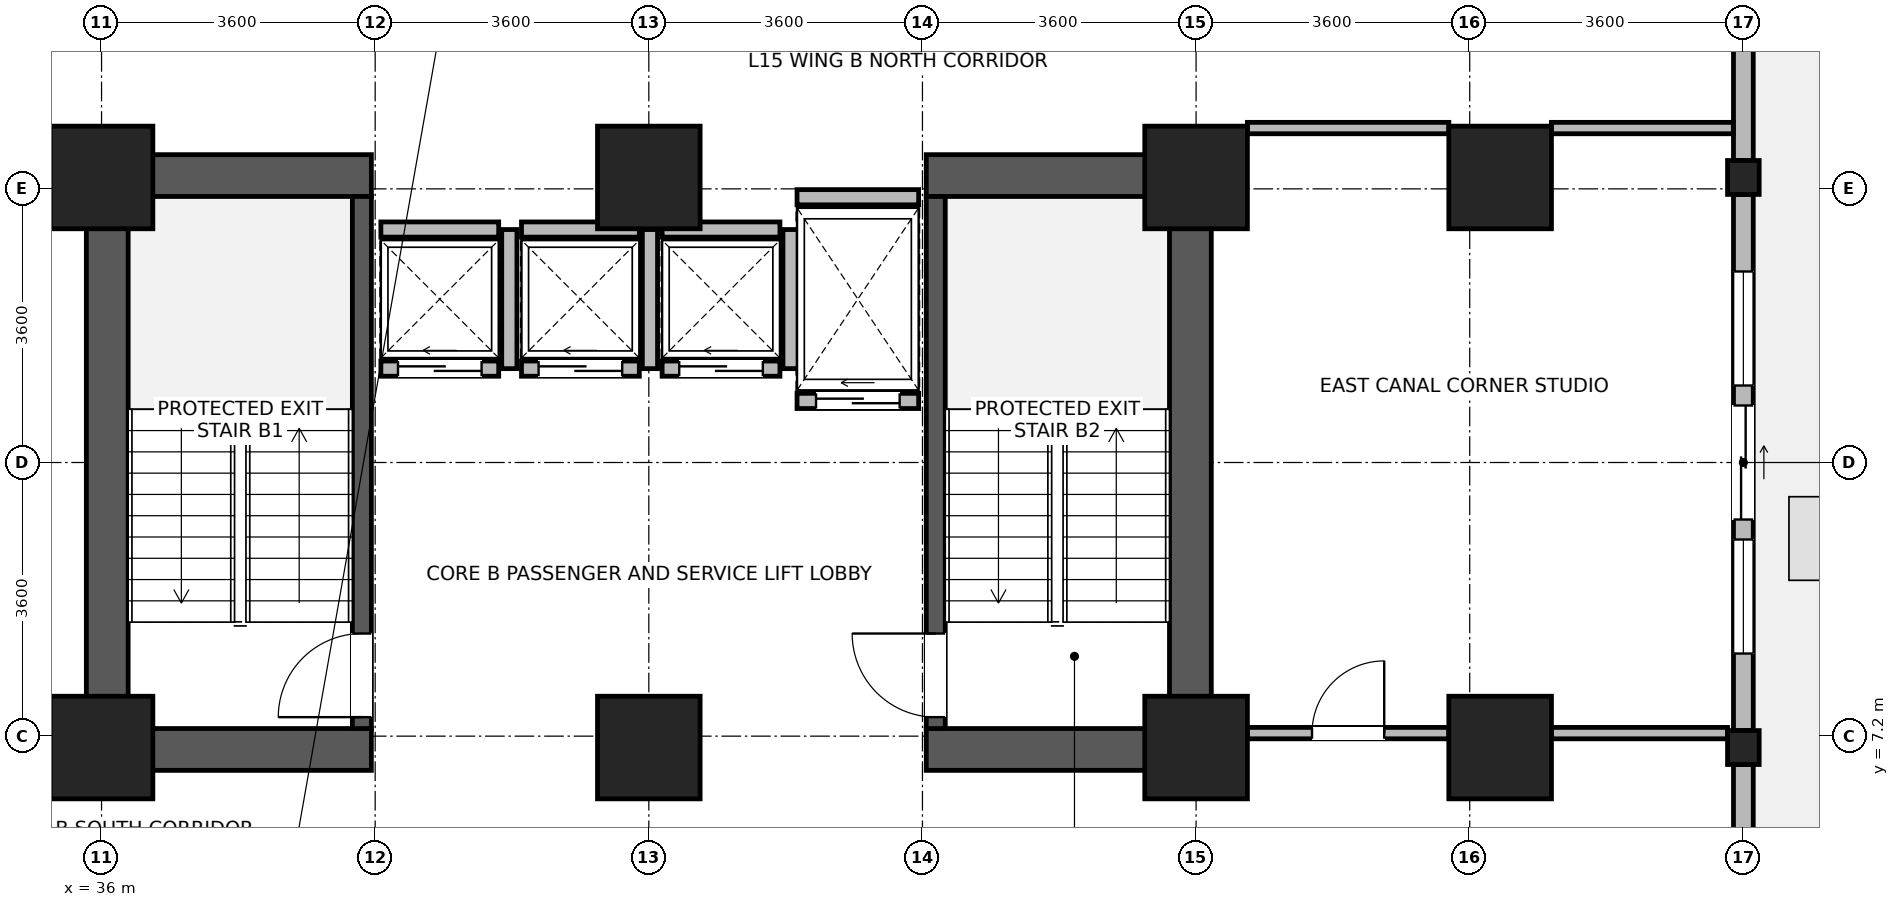
"""IFC4 building model, lengths in metres.
Left out: names, types, materials, properties, quantities, classifications, styles, units other than length and angle.
Written with IfcOpenShell. Run it as: python <this file> out.ifc"""

import sys

from ifc_helpers import new_model, si_unit, direction, frame, frame_2d, origin, origin_2d, place, context, subcontext, project, spatial, rectangle, i_section, extrude, source, transform, mapped, element, fill, save


model = new_model("IFC4")
c1 = context("Model", 3, precision=1e-05, world=origin(), true_north=direction((0.0, 1.0)))
c2 = subcontext(c1, "Body", "Model", "MODEL_VIEW")
j1 = project(units=[si_unit("LENGTHUNIT", "METRE"), si_unit("PLANEANGLEUNIT", "RADIAN")], contexts=[c1])
p1 = place(None, origin())
s1 = spatial("IfcSite", under=j1, at=p1, CompositionType="ELEMENT")
p2 = place(p1, origin())
s2 = spatial("IfcBuilding", under=s1, at=p2, CompositionType="ELEMENT")
p3 = place(p2, frame((0.0, 0.0, 62.3)))
s3 = spatial("IfcBuildingStorey", under=s2, at=p3, CompositionType="ELEMENT", Elevation=62.3)
for number, where, z_axis, x_axis in (
    (1, (36.075, 6.75, 0.0), (0.0, 0.0, 1.0), (0.0, 1.0, 0.0)),
    (2, (50.325, 6.75, 0.0), (0.0, 0.0, 1.0), (0.0, 1.0, 0.0)),
):
    element("IfcWall", number, at=place(p3, frame(where, z_axis=z_axis, x_axis=x_axis)), inside=s3, PredefinedType="SHEAR", context=c2, shape_type="SweptSolid", body=[
        extrude(rectangle(XDim=8.1, YDim=0.55, at=frame_2d((4.05, 0.0))), origin(), (0.0, 0.0, 1.0), 3.45),
    ])
for number, where, z_axis, x_axis in (
    (3, (36.35, 7.025, 0.0), (0.0, 0.0, 1.0), (1.0, 0.0, 0.0)),
    (4, (46.85, 7.025, 0.0), (0.0, 0.0, 1.0), (1.0, 0.0, 0.0)),
    (5, (36.35, 14.575, 0.0), (0.0, 0.0, 1.0), (1.0, 0.0, 0.0)),
    (6, (46.85, 14.575, 0.0), (0.0, 0.0, 1.0), (1.0, 0.0, 0.0)),
):
    element("IfcWall", number, at=place(p3, frame(where, z_axis=z_axis, x_axis=x_axis)), inside=s3, PredefinedType="SHEAR", context=c2, shape_type="SweptSolid", body=[
        extrude(rectangle(XDim=3.2, YDim=0.55, at=frame_2d((1.6, 0.0))), origin(), (0.0, 0.0, 1.0), 3.45),
    ])
p4 = place(p3, frame((39.425, 7.3, 0.0), z_axis=(0.0, 0.0, 1.0), x_axis=(0.0, 1.0, 0.0)))
e7 = element("IfcWall", 7, at=p4, inside=s3, PredefinedType="SHEAR", context=c2, shape_type="SweptSolid", body=[
    extrude(rectangle(XDim=7.0, YDim=0.25, at=frame_2d((3.5, 0.0))), origin(), (0.0, 0.0, 1.0), 3.45),
])
p5 = place(p4, frame((0.15, 0.0, 0.0)))
e8 = element("IfcOpeningElement", 8, at=p5, cuts=e7, PredefinedType="OPENING", context=c2, shape_type="SweptSolid", body=[
    extrude(rectangle(XDim=1.1, YDim=2.08, at=frame_2d((0.55, 1.04))), frame((0.0, 0.135, 0.0), z_axis=(0.0, -1.0, 0.0), x_axis=(1.0, 0.0, 0.0)), (0.0, 0.0, 1.0), 0.27),
])
p6 = place(p3, frame((46.975, 7.3, 0.0), z_axis=(0.0, 0.0, 1.0), x_axis=(0.0, 1.0, 0.0)))
e9 = element("IfcWall", 9, at=p6, inside=s3, PredefinedType="SHEAR", context=c2, shape_type="SweptSolid", body=[
    extrude(rectangle(XDim=7.0, YDim=0.25, at=frame_2d((3.5, 0.0))), origin(), (0.0, 0.0, 1.0), 3.45),
])
p7 = place(p6, frame((0.15, 0.0, 0.0)))
e10 = element("IfcOpeningElement", 10, at=p7, cuts=e9, PredefinedType="OPENING", context=c2, shape_type="SweptSolid", body=[
    extrude(rectangle(XDim=1.1, YDim=2.08, at=frame_2d((0.55, 1.04))), frame((0.0, 0.135, 0.0), z_axis=(0.0, -1.0, 0.0), x_axis=(1.0, 0.0, 0.0)), (0.0, 0.0, 1.0), 0.27),
])
m1 = source(origin(), c2, "Body", "SweptSolid", [
    extrude(rectangle(XDim=1.35, YDim=1.35, at=origin_2d()), origin(), (0.0, 0.0, 1.0), 3.7),
])
for number, where, z_axis, x_axis in (
    (11, (36.0, 7.05, 0.0), (0.0, 0.0, 1.0), (1.0, 0.0, 0.0)),
    (12, (36.0, 14.55, 0.0), (0.0, 0.0, 1.0), (1.0, 0.0, 0.0)),
    (13, (43.2, 7.05, 0.0), (0.0, 0.0, 1.0), (1.0, 0.0, 0.0)),
    (14, (43.2, 14.55, 0.0), (0.0, 0.0, 1.0), (1.0, 0.0, 0.0)),
    (15, (50.4, 7.05, 0.0), (0.0, 0.0, 1.0), (1.0, 0.0, 0.0)),
    (16, (50.4, 14.55, 0.0), (0.0, 0.0, 1.0), (1.0, 0.0, 0.0)),
    (17, (54.4, 7.05, 0.0), (0.0, 0.0, 1.0), (1.0, 0.0, 0.0)),
    (18, (54.4, 14.55, 0.0), (0.0, 0.0, 1.0), (1.0, 0.0, 0.0)),
):
    element("IfcColumn", number, at=place(p3, frame(where, z_axis=z_axis, x_axis=x_axis)), inside=s3, PredefinedType="COLUMN", context=c2, shape_type="MappedRepresentation", body=[
        mapped(m1, transform((0.0, 0.0, 0.0), x_axis=(1.0, 0.0, 0.0), y_axis=(0.0, 1.0, 0.0), z_axis=(0.0, 0.0, 1.0), scale=1.0)),
    ])
m2 = source(origin(), c2, "Body", "SweptSolid", [
    extrude(i_section(OverallWidth=0.416, OverallDepth=0.446, WebThickness=0.029, FlangeThickness=0.04, FilletRadius=0.015, at=origin_2d()), origin(), (0.0, 0.0, 1.0), 3.7),
])
for number, where, z_axis, x_axis in (
    (19, (57.6, 7.05, 0.0), (0.0, 0.0, 1.0), (1.0, 0.0, 0.0)),
    (20, (57.6, 14.55, 0.0), (0.0, 0.0, 1.0), (1.0, 0.0, 0.0)),
):
    element("IfcColumn", number, at=place(p3, frame(where, z_axis=z_axis, x_axis=x_axis)), inside=s3, PredefinedType="COLUMN", context=c2, shape_type="MappedRepresentation", body=[
        mapped(m2, transform((0.0, 0.0, 0.0), x_axis=(1.0, 0.0, 0.0), y_axis=(0.0, 1.0, 0.0), z_axis=(0.0, 0.0, 1.0), scale=1.0)),
    ])
p8 = place(p3, frame((57.6, 6.826, 0.0), z_axis=(0.0, 0.0, 1.0), x_axis=(0.0, -1.0, 0.0)))
e21 = element("IfcWall", 21, at=p8, inside=s3, PredefinedType="STANDARD", context=c2, shape_type="SweptSolid", body=[
    extrude(rectangle(XDim=2.156, YDim=0.26, at=frame_2d((1.078, 0.0))), origin(), (0.0, 0.0, 1.0), 3.43),
])
p9 = place(p3, frame((57.6, 14.326, 0.0), z_axis=(0.0, 0.0, 1.0), x_axis=(0.0, -1.0, 0.0)))
e22 = element("IfcWall", 22, at=p9, inside=s3, PredefinedType="STANDARD", context=c2, shape_type="SweptSolid", body=[
    extrude(rectangle(XDim=7.052, YDim=0.26, at=frame_2d((3.526, 0.0))), origin(), (0.0, 0.0, 1.0), 2.93),
])
p10 = place(p9, frame((2.776, 0.0, 0.0)))
e23 = element("IfcOpeningElement", 23, at=p10, cuts=e22, PredefinedType="OPENING", context=c2, shape_type="SweptSolid", body=[
    extrude(rectangle(XDim=1.5, YDim=2.15, at=frame_2d((0.75, 1.075))), frame((0.0, 0.14, 0.0), z_axis=(0.0, -1.0, 0.0), x_axis=(1.0, 0.0, 0.0)), (0.0, 0.0, 1.0), 0.28),
])
p11 = place(p9, frame((1.013, 0.0, 0.85)))
e24 = element("IfcOpeningElement", 24, at=p11, cuts=e22, PredefinedType="OPENING", context=c2, shape_type="SweptSolid", body=[
    extrude(rectangle(XDim=1.5, YDim=1.85, at=frame_2d((0.75, 0.925))), frame((0.0, 0.14, 0.0), z_axis=(0.0, -1.0, 0.0), x_axis=(1.0, 0.0, 0.0)), (0.0, 0.0, 1.0), 0.28),
])
p12 = place(p9, frame((4.539, 0.0, 0.85)))
e25 = element("IfcOpeningElement", 25, at=p12, cuts=e22, PredefinedType="OPENING", context=c2, shape_type="SweptSolid", body=[
    extrude(rectangle(XDim=1.5, YDim=1.85, at=frame_2d((0.75, 0.925))), frame((0.0, 0.14, 0.0), z_axis=(0.0, -1.0, 0.0), x_axis=(1.0, 0.0, 0.0)), (0.0, 0.0, 1.0), 0.28),
])
p13 = place(p3, frame((57.6, 21.376, 0.0), z_axis=(0.0, 0.0, 1.0), x_axis=(0.0, -1.0, 0.0)))
e26 = element("IfcWall", 26, at=p13, inside=s3, PredefinedType="STANDARD", context=c2, shape_type="SweptSolid", body=[
    extrude(rectangle(XDim=6.602, YDim=0.26, at=frame_2d((3.301, 0.0))), origin(), (0.0, 0.0, 1.0), 2.93),
])
p14 = place(p13, frame((0.9, 0.0, 0.85)))
e27 = element("IfcOpeningElement", 27, at=p14, cuts=e26, PredefinedType="OPENING", context=c2, shape_type="SweptSolid", body=[
    extrude(rectangle(XDim=1.5, YDim=1.85, at=frame_2d((0.75, 0.925))), frame((0.0, 0.14, 0.0), z_axis=(0.0, -1.0, 0.0), x_axis=(1.0, 0.0, 0.0)), (0.0, 0.0, 1.0), 0.28),
])
p15 = place(p13, frame((2.826, 0.0, 0.85)))
e28 = element("IfcOpeningElement", 28, at=p15, cuts=e26, PredefinedType="OPENING", context=c2, shape_type="SweptSolid", body=[
    extrude(rectangle(XDim=0.95, YDim=1.75, at=frame_2d((0.475, 0.875))), frame((0.0, 0.14, 0.0), z_axis=(0.0, -1.0, 0.0), x_axis=(1.0, 0.0, 0.0)), (0.0, 0.0, 1.0), 0.28),
])
p16 = place(p3, frame((39.675, 12.035, 0.0), z_axis=(0.0, 0.0, 1.0), x_axis=(1.0, 0.0, 0.0)))
e29 = element("IfcWall", 29, at=p16, inside=s3, PredefinedType="PARTITIONING", context=c2, shape_type="SweptSolid", body=[
    extrude(rectangle(XDim=1.55, YDim=0.2, at=frame_2d((0.775, 0.0))), origin(), (0.0, 0.0, 1.0), 3.43),
])
p17 = place(p16, frame((0.225, 0.0, 0.0)))
e30 = element("IfcOpeningElement", 30, at=p17, cuts=e29, PredefinedType="OPENING", context=c2, shape_type="SweptSolid", body=[
    extrude(rectangle(XDim=1.1, YDim=2.12, at=frame_2d((0.55, 1.06))), frame((0.0, 0.11, 0.0), z_axis=(0.0, -1.0, 0.0), x_axis=(1.0, 0.0, 0.0)), (0.0, 0.0, 1.0), 0.22),
])
p18 = place(p3, frame((39.675, 13.865, 0.0), z_axis=(0.0, 0.0, 1.0), x_axis=(1.0, 0.0, 0.0)))
e31 = element("IfcWall", 31, at=p18, inside=s3, PredefinedType="PARTITIONING", context=c2, shape_type="SweptSolid", body=[
    extrude(rectangle(XDim=1.55, YDim=0.2, at=frame_2d((0.775, 0.0))), origin(), (0.0, 0.0, 1.0), 3.43),
])
p19 = place(p3, frame((41.365, 12.035, 0.0), z_axis=(0.0, 0.0, 1.0), x_axis=(0.0, 1.0, 0.0)))
e32 = element("IfcWall", 32, at=p19, inside=s3, PredefinedType="PARTITIONING", context=c2, shape_type="SweptSolid", body=[
    extrude(rectangle(XDim=1.83, YDim=0.2, at=frame_2d((0.915, 0.0))), origin(), (0.0, 0.0, 1.0), 3.43),
])
p20 = place(p3, frame((41.525, 12.035, 0.0), z_axis=(0.0, 0.0, 1.0), x_axis=(1.0, 0.0, 0.0)))
e33 = element("IfcWall", 33, at=p20, inside=s3, PredefinedType="PARTITIONING", context=c2, shape_type="SweptSolid", body=[
    extrude(rectangle(XDim=1.55, YDim=0.2, at=frame_2d((0.775, 0.0))), origin(), (0.0, 0.0, 1.0), 3.43),
])
p21 = place(p20, frame((0.225, 0.0, 0.0)))
e34 = element("IfcOpeningElement", 34, at=p21, cuts=e33, PredefinedType="OPENING", context=c2, shape_type="SweptSolid", body=[
    extrude(rectangle(XDim=1.1, YDim=2.12, at=frame_2d((0.55, 1.06))), frame((0.0, 0.11, 0.0), z_axis=(0.0, -1.0, 0.0), x_axis=(1.0, 0.0, 0.0)), (0.0, 0.0, 1.0), 0.22),
])
p22 = place(p3, frame((41.525, 13.865, 0.0), z_axis=(0.0, 0.0, 1.0), x_axis=(1.0, 0.0, 0.0)))
e35 = element("IfcWall", 35, at=p22, inside=s3, PredefinedType="PARTITIONING", context=c2, shape_type="SweptSolid", body=[
    extrude(rectangle(XDim=1.55, YDim=0.2, at=frame_2d((0.775, 0.0))), origin(), (0.0, 0.0, 1.0), 3.43),
])
p23 = place(p3, frame((43.215, 12.035, 0.0), z_axis=(0.0, 0.0, 1.0), x_axis=(0.0, 1.0, 0.0)))
e36 = element("IfcWall", 36, at=p23, inside=s3, PredefinedType="PARTITIONING", context=c2, shape_type="SweptSolid", body=[
    extrude(rectangle(XDim=1.83, YDim=0.2, at=frame_2d((0.915, 0.0))), origin(), (0.0, 0.0, 1.0), 3.43),
])
p24 = place(p3, frame((43.375, 12.035, 0.0), z_axis=(0.0, 0.0, 1.0), x_axis=(1.0, 0.0, 0.0)))
e37 = element("IfcWall", 37, at=p24, inside=s3, PredefinedType="PARTITIONING", context=c2, shape_type="SweptSolid", body=[
    extrude(rectangle(XDim=1.55, YDim=0.2, at=frame_2d((0.775, 0.0))), origin(), (0.0, 0.0, 1.0), 3.43),
])
p25 = place(p24, frame((0.225, 0.0, 0.0)))
e38 = element("IfcOpeningElement", 38, at=p25, cuts=e37, PredefinedType="OPENING", context=c2, shape_type="SweptSolid", body=[
    extrude(rectangle(XDim=1.1, YDim=2.12, at=frame_2d((0.55, 1.06))), frame((0.0, 0.11, 0.0), z_axis=(0.0, -1.0, 0.0), x_axis=(1.0, 0.0, 0.0)), (0.0, 0.0, 1.0), 0.22),
])
p26 = place(p3, frame((43.375, 13.865, 0.0), z_axis=(0.0, 0.0, 1.0), x_axis=(1.0, 0.0, 0.0)))
e39 = element("IfcWall", 39, at=p26, inside=s3, PredefinedType="PARTITIONING", context=c2, shape_type="SweptSolid", body=[
    extrude(rectangle(XDim=1.55, YDim=0.2, at=frame_2d((0.775, 0.0))), origin(), (0.0, 0.0, 1.0), 3.43),
])
p27 = place(p3, frame((45.065, 12.035, 0.0), z_axis=(0.0, 0.0, 1.0), x_axis=(0.0, 1.0, 0.0)))
e40 = element("IfcWall", 40, at=p27, inside=s3, PredefinedType="PARTITIONING", context=c2, shape_type="SweptSolid", body=[
    extrude(rectangle(XDim=1.83, YDim=0.2, at=frame_2d((0.915, 0.0))), origin(), (0.0, 0.0, 1.0), 3.43),
])
p28 = place(p3, frame((45.15, 11.61, 0.0), z_axis=(0.0, 0.0, 1.0), x_axis=(1.0, 0.0, 0.0)))
e41 = element("IfcWall", 41, at=p28, inside=s3, PredefinedType="PARTITIONING", context=c2, shape_type="SweptSolid", body=[
    extrude(rectangle(XDim=1.6, YDim=0.2, at=frame_2d((0.8, 0.0))), origin(), (0.0, 0.0, 1.0), 3.43),
])
p29 = place(p28, frame((0.25, 0.0, 0.0)))
e42 = element("IfcOpeningElement", 42, at=p29, cuts=e41, PredefinedType="OPENING", context=c2, shape_type="SweptSolid", body=[
    extrude(rectangle(XDim=1.1, YDim=2.12, at=frame_2d((0.55, 1.06))), frame((0.0, 0.11, 0.0), z_axis=(0.0, -1.0, 0.0), x_axis=(1.0, 0.0, 0.0)), (0.0, 0.0, 1.0), 0.22),
])
p30 = place(p3, frame((45.15, 14.29, 0.0), z_axis=(0.0, 0.0, 1.0), x_axis=(1.0, 0.0, 0.0)))
e43 = element("IfcWall", 43, at=p30, inside=s3, PredefinedType="PARTITIONING", context=c2, shape_type="SweptSolid", body=[
    extrude(rectangle(XDim=1.6, YDim=0.2, at=frame_2d((0.8, 0.0))), origin(), (0.0, 0.0, 1.0), 2.23),
])
p31 = place(p3, frame((51.075, 7.24, 0.0), z_axis=(0.0, 0.0, 1.0), x_axis=(1.0, 0.0, 0.0)))
e44 = element("IfcWall", 44, at=p31, inside=s3, PredefinedType="PARTITIONING", context=c2, shape_type="SweptSolid", body=[
    extrude(rectangle(XDim=2.65, YDim=0.15, at=frame_2d((1.325, 0.0))), origin(), (0.0, 0.0, 1.0), 2.78),
])
p32 = place(p31, frame((0.85, 0.0, 0.0)))
e45 = element("IfcOpeningElement", 45, at=p32, cuts=e44, PredefinedType="OPENING", context=c2, shape_type="SweptSolid", body=[
    extrude(rectangle(XDim=0.95, YDim=2.1, at=frame_2d((0.475, 1.05))), frame((0.0, 0.085, 0.0), z_axis=(0.0, -1.0, 0.0), x_axis=(1.0, 0.0, 0.0)), (0.0, 0.0, 1.0), 0.17),
])
p33 = place(p3, frame((55.075, 7.24, 0.0), z_axis=(0.0, 0.0, 1.0), x_axis=(1.0, 0.0, 0.0)))
e46 = element("IfcWall", 46, at=p33, inside=s3, PredefinedType="PARTITIONING", context=c2, shape_type="SweptSolid", body=[
    extrude(rectangle(XDim=2.317, YDim=0.15, at=frame_2d((1.159, 0.0))), origin(), (0.0, 0.0, 1.0), 2.78),
])
p34 = place(p3, frame((51.075, 15.2, 0.0), z_axis=(0.0, 0.0, 1.0), x_axis=(1.0, 0.0, 0.0)))
e47 = element("IfcWall", 47, at=p34, inside=s3, PredefinedType="PARTITIONING", context=c2, shape_type="SweptSolid", body=[
    extrude(rectangle(XDim=2.65, YDim=0.15, at=frame_2d((1.325, 0.0))), origin(), (0.0, 0.0, 1.0), 3.43),
])
p35 = place(p3, frame((55.075, 15.2, 0.0), z_axis=(0.0, 0.0, 1.0), x_axis=(1.0, 0.0, 0.0)))
e48 = element("IfcWall", 48, at=p35, inside=s3, PredefinedType="PARTITIONING", context=c2, shape_type="SweptSolid", body=[
    extrude(rectangle(XDim=2.393, YDim=0.15, at=frame_2d((1.197, 0.0))), origin(), (0.0, 0.0, 1.0), 3.43),
])
p36 = place(p10, origin())
e49 = element("IfcDoor", 49, at=p36, inside=s3, OperationType="SLIDING_TO_LEFT", PredefinedType="DOOR", context=c2, shape_type="SweptSolid", body=[
    extrude(rectangle(XDim=1.5, YDim=2.15, at=frame_2d((0.75, 1.075))), frame((0.0, 0.025, 0.0), z_axis=(0.0, -1.0, 0.0), x_axis=(1.0, 0.0, 0.0)), (0.0, 0.0, 1.0), 0.05),
])
fill(e23, e49)
p37 = place(p11, origin())
e50 = element("IfcWindow", 50, at=p37, inside=s3, PartitioningType="SINGLE_PANEL", PredefinedType="WINDOW", context=c2, shape_type="SweptSolid", body=[
    extrude(rectangle(XDim=1.5, YDim=1.85, at=frame_2d((0.75, 0.925))), frame((0.0, 0.03, 0.0), z_axis=(0.0, -1.0, 0.0), x_axis=(1.0, 0.0, 0.0)), (0.0, 0.0, 1.0), 0.06),
])
fill(e24, e50)
p38 = place(p12, origin())
e51 = element("IfcWindow", 51, at=p38, inside=s3, PartitioningType="SINGLE_PANEL", PredefinedType="WINDOW", context=c2, shape_type="SweptSolid", body=[
    extrude(rectangle(XDim=1.5, YDim=1.85, at=frame_2d((0.75, 0.925))), frame((0.0, 0.03, 0.0), z_axis=(0.0, -1.0, 0.0), x_axis=(1.0, 0.0, 0.0)), (0.0, 0.0, 1.0), 0.06),
])
fill(e25, e51)
p39 = place(p5, origin())
e52 = element("IfcDoor", 52, at=p39, inside=s3, OperationType="SINGLE_SWING_LEFT", PredefinedType="DOOR", context=c2, shape_type="SweptSolid", body=[
    extrude(rectangle(XDim=1.1, YDim=2.08, at=frame_2d((0.55, 1.04))), frame((0.0, 0.025, 0.0), z_axis=(0.0, -1.0, 0.0), x_axis=(1.0, 0.0, 0.0)), (0.0, 0.0, 1.0), 0.05),
])
fill(e8, e52)
p40 = place(p7, origin())
e53 = element("IfcDoor", 53, at=p40, inside=s3, OperationType="SINGLE_SWING_RIGHT", PredefinedType="DOOR", context=c2, shape_type="SweptSolid", body=[
    extrude(rectangle(XDim=1.1, YDim=2.08, at=frame_2d((0.55, 1.04))), frame((0.0, 0.025, 0.0), z_axis=(0.0, -1.0, 0.0), x_axis=(1.0, 0.0, 0.0)), (0.0, 0.0, 1.0), 0.05),
])
fill(e10, e53)
p41 = place(p17, origin())
e54 = element("IfcDoor", 54, at=p41, inside=s3, OperationType="SLIDING_TO_LEFT", PredefinedType="DOOR", context=c2, shape_type="SweptSolid", body=[
    extrude(rectangle(XDim=1.1, YDim=2.12, at=frame_2d((0.55, 1.06))), frame((0.0, 0.025, 0.0), z_axis=(0.0, -1.0, 0.0), x_axis=(1.0, 0.0, 0.0)), (0.0, 0.0, 1.0), 0.05),
])
fill(e30, e54)
p42 = place(p21, origin())
e55 = element("IfcDoor", 55, at=p42, inside=s3, OperationType="SLIDING_TO_LEFT", PredefinedType="DOOR", context=c2, shape_type="SweptSolid", body=[
    extrude(rectangle(XDim=1.1, YDim=2.12, at=frame_2d((0.55, 1.06))), frame((0.0, 0.025, 0.0), z_axis=(0.0, -1.0, 0.0), x_axis=(1.0, 0.0, 0.0)), (0.0, 0.0, 1.0), 0.05),
])
fill(e34, e55)
p43 = place(p25, origin())
e56 = element("IfcDoor", 56, at=p43, inside=s3, OperationType="SLIDING_TO_LEFT", PredefinedType="DOOR", context=c2, shape_type="SweptSolid", body=[
    extrude(rectangle(XDim=1.1, YDim=2.12, at=frame_2d((0.55, 1.06))), frame((0.0, 0.025, 0.0), z_axis=(0.0, -1.0, 0.0), x_axis=(1.0, 0.0, 0.0)), (0.0, 0.0, 1.0), 0.05),
])
fill(e38, e56)
p44 = place(p29, origin())
e57 = element("IfcDoor", 57, at=p44, inside=s3, OperationType="SLIDING_TO_LEFT", PredefinedType="DOOR", context=c2, shape_type="SweptSolid", body=[
    extrude(rectangle(XDim=1.1, YDim=2.12, at=frame_2d((0.55, 1.06))), frame((0.0, 0.025, 0.0), z_axis=(0.0, -1.0, 0.0), x_axis=(1.0, 0.0, 0.0)), (0.0, 0.0, 1.0), 0.05),
])
fill(e42, e57)
p45 = place(p32, origin())
e58 = element("IfcDoor", 58, at=p45, inside=s3, OperationType="SINGLE_SWING_RIGHT", PredefinedType="DOOR", context=c2, shape_type="SweptSolid", body=[
    extrude(rectangle(XDim=0.95, YDim=2.1, at=frame_2d((0.475, 1.05))), frame((0.0, 0.025, 0.0), z_axis=(0.0, -1.0, 0.0), x_axis=(1.0, 0.0, 0.0)), (0.0, 0.0, 1.0), 0.05),
])
fill(e45, e58)
save(model, sys.argv[1])
